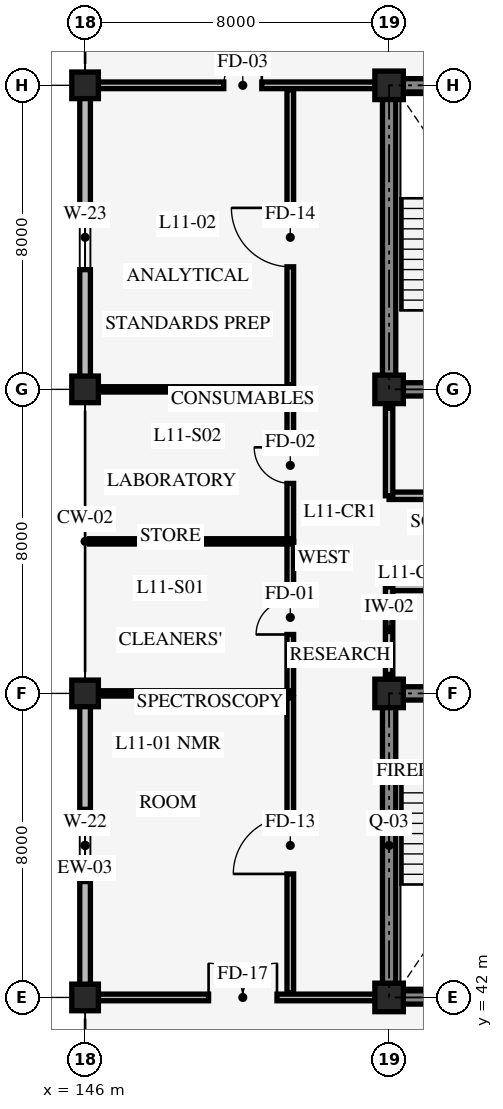
"""IFC4 building model, lengths in metres.
Left out: names, types, materials, properties, quantities, classifications, styles, units other than length and angle.
Written with IfcOpenShell. Run it as: python <this file> out.ifc"""

import sys

from ifc_helpers import new_model, si_unit, direction, frame, frame_2d, origin, origin_2d, place, context, subcontext, project, spatial, rectangle, extrude, element, fill, save


model = new_model("IFC4")
c1 = context("Model", 3, precision=1e-05, world=origin(), true_north=direction((0.0, 1.0)))
c2 = subcontext(c1, "Body", "Model", "MODEL_VIEW")
j1 = project(units=[si_unit("LENGTHUNIT", "METRE"), si_unit("PLANEANGLEUNIT", "RADIAN")], contexts=[c1])
p1 = place(None, origin())
s1 = spatial("IfcSite", under=j1, at=p1, CompositionType="ELEMENT")
p2 = place(p1, origin())
s2 = spatial("IfcBuilding", under=s1, at=p2, CompositionType="ELEMENT")
p3 = place(p2, frame((0.0, 0.0, 44.4)))
s3 = spatial("IfcBuildingStorey", under=s2, at=p3, CompositionType="ELEMENT", Elevation=44.4)
p4 = place(p3, frame((154.0, 42.0, 0.0), z_axis=(0.0, 0.0, 1.0), x_axis=(1.0, 0.0, 0.0)))
e1 = element("IfcWall", 1, at=p4, inside=s3, PredefinedType="SHEAR", context=c2, shape_type="SweptSolid", body=[
    extrude(rectangle(XDim=8.0, YDim=0.35, at=frame_2d((4.0, 0.0))), origin(), (0.0, 0.0, 1.0), 3.95),
])
p5 = place(p3, frame((162.0, 50.0, 0.0), z_axis=(0.0, 0.0, 1.0), x_axis=(-1.0, 0.0, 0.0)))
e2 = element("IfcWall", 2, at=p5, inside=s3, PredefinedType="SHEAR", context=c2, shape_type="SweptSolid", body=[
    extrude(rectangle(XDim=8.0, YDim=0.35, at=frame_2d((4.0, 0.0))), origin(), (0.0, 0.0, 1.0), 3.95),
])
p6 = place(p5, frame((5.3, 0.0, 0.0)))
e3 = element("IfcOpeningElement", 3, at=p6, cuts=e2, PredefinedType="OPENING", context=c2, shape_type="SweptSolid", body=[
    extrude(rectangle(XDim=1.3, YDim=2.15, at=frame_2d((0.65, 1.075))), frame((0.0, 0.185, 0.0), z_axis=(0.0, -1.0, 0.0), x_axis=(1.0, 0.0, 0.0)), (0.0, 0.0, 1.0), 0.37),
])
p7 = place(p5, frame((1.45, 0.0, 0.0)))
e4 = element("IfcOpeningElement", 4, at=p7, cuts=e2, PredefinedType="OPENING", context=c2, shape_type="SweptSolid", body=[
    extrude(rectangle(XDim=1.1, YDim=2.2, at=frame_2d((0.55, 1.1))), frame((0.0, 0.185, 0.0), z_axis=(0.0, -1.0, 0.0), x_axis=(1.0, 0.0, 0.0)), (0.0, 0.0, 1.0), 0.37),
])
p8 = place(p3, frame((154.0, 50.0, 0.0), z_axis=(0.0, 0.0, 1.0), x_axis=(0.0, -1.0, 0.0)))
e5 = element("IfcWall", 5, at=p8, inside=s3, PredefinedType="SHEAR", context=c2, shape_type="SweptSolid", body=[
    extrude(rectangle(XDim=8.0, YDim=0.35, at=frame_2d((4.0, 0.0))), origin(), (0.0, 0.0, 1.0), 3.95),
])
p9 = place(p3, frame((154.0, 58.0, 0.0), z_axis=(0.0, 0.0, 1.0), x_axis=(1.0, 0.0, 0.0)))
e6 = element("IfcWall", 6, at=p9, inside=s3, PredefinedType="SHEAR", context=c2, shape_type="SweptSolid", body=[
    extrude(rectangle(XDim=8.0, YDim=0.35, at=frame_2d((4.0, 0.0))), origin(), (0.0, 0.0, 1.0), 3.95),
])
p10 = place(p9, frame((1.4, 0.0, 0.0)))
e7 = element("IfcOpeningElement", 7, at=p10, cuts=e6, PredefinedType="OPENING", context=c2, shape_type="SweptSolid", body=[
    extrude(rectangle(XDim=1.3, YDim=2.15, at=frame_2d((0.65, 1.075))), frame((0.0, 0.185, 0.0), z_axis=(0.0, -1.0, 0.0), x_axis=(1.0, 0.0, 0.0)), (0.0, 0.0, 1.0), 0.37),
])
p11 = place(p9, frame((5.3, 0.0, 0.0)))
e8 = element("IfcOpeningElement", 8, at=p11, cuts=e6, PredefinedType="OPENING", context=c2, shape_type="SweptSolid", body=[
    extrude(rectangle(XDim=1.1, YDim=2.2, at=frame_2d((0.55, 1.1))), frame((0.0, 0.185, 0.0), z_axis=(0.0, -1.0, 0.0), x_axis=(1.0, 0.0, 0.0)), (0.0, 0.0, 1.0), 0.37),
])
for number, where, z_axis, x_axis in (
    (9, (162.0, 66.0, 0.0), (0.0, 0.0, 1.0), (-1.0, 0.0, 0.0)),
    (10, (154.0, 66.0, 0.0), (0.0, 0.0, 1.0), (0.0, -1.0, 0.0)),
):
    element("IfcWall", number, at=place(p3, frame(where, z_axis=z_axis, x_axis=x_axis)), inside=s3, PredefinedType="SHEAR", context=c2, shape_type="SweptSolid", body=[
        extrude(rectangle(XDim=8.0, YDim=0.35, at=frame_2d((4.0, 0.0))), origin(), (0.0, 0.0, 1.0), 3.95),
    ])
for number, where, z_axis, x_axis in (
    (11, (146.0, 42.0, 0.0), (0.0, 0.0, 1.0), (1.0, 0.0, 0.0)),
    (12, (146.0, 50.0, 0.0), (0.0, 0.0, 1.0), (1.0, 0.0, 0.0)),
    (13, (146.0, 58.0, 0.0), (0.0, 0.0, 1.0), (1.0, 0.0, 0.0)),
    (14, (146.0, 66.0, 0.0), (0.0, 0.0, 1.0), (1.0, 0.0, 0.0)),
):
    element("IfcColumn", number, at=place(p3, frame(where, z_axis=z_axis, x_axis=x_axis)), inside=s3, PredefinedType="COLUMN", context=c2, shape_type="SweptSolid", body=[
        extrude(rectangle(XDim=0.7, YDim=0.7, at=origin_2d()), origin(), (0.0, 0.0, 1.0), 4.2),
    ])
for number, where, z_axis, x_axis in (
    (15, (154.0, 42.0, 0.0), (0.0, 0.0, 1.0), (1.0, 0.0, 0.0)),
    (16, (154.0, 50.0, 0.0), (0.0, 0.0, 1.0), (1.0, 0.0, 0.0)),
    (17, (154.0, 58.0, 0.0), (0.0, 0.0, 1.0), (1.0, 0.0, 0.0)),
    (18, (154.0, 66.0, 0.0), (0.0, 0.0, 1.0), (1.0, 0.0, 0.0)),
):
    element("IfcColumn", number, at=place(p3, frame(where, z_axis=z_axis, x_axis=x_axis)), inside=s3, PredefinedType="COLUMN", context=c2, shape_type="SweptSolid", body=[
        extrude(rectangle(XDim=0.75, YDim=0.75, at=origin_2d()), origin(), (0.0, 0.0, 1.0), 4.2),
    ])
p12 = place(p3, frame((146.0, 42.0, 0.0), z_axis=(0.0, 0.0, 1.0), x_axis=(0.0, 1.0, 0.0)))
e19 = element("IfcWall", 19, at=p12, inside=s3, PredefinedType="STANDARD", context=c2, shape_type="SweptSolid", body=[
    extrude(rectangle(XDim=8.0, YDim=0.28, at=frame_2d((4.0, 0.0))), origin(), (0.0, 0.0, 1.0), 3.24),
])
p13 = place(p12, frame((3.05, 0.0, 0.85)))
e20 = element("IfcOpeningElement", 20, at=p13, cuts=e19, PredefinedType="OPENING", context=c2, shape_type="SweptSolid", body=[
    extrude(rectangle(XDim=1.9, YDim=1.3, at=frame_2d((0.95, 0.65))), frame((0.0, 0.15, 0.0), z_axis=(0.0, -1.0, 0.0), x_axis=(1.0, 0.0, 0.0)), (0.0, 0.0, 1.0), 0.3),
])
p14 = place(p3, frame((146.0, 58.0, 0.0), z_axis=(0.0, 0.0, 1.0), x_axis=(0.0, 1.0, 0.0)))
e21 = element("IfcWall", 21, at=p14, inside=s3, PredefinedType="STANDARD", context=c2, shape_type="SweptSolid", body=[
    extrude(rectangle(XDim=8.0, YDim=0.28, at=frame_2d((4.0, 0.0))), origin(), (0.0, 0.0, 1.0), 3.24),
])
p15 = place(p14, frame((3.15, 0.0, 0.85)))
e22 = element("IfcOpeningElement", 22, at=p15, cuts=e21, PredefinedType="OPENING", context=c2, shape_type="SweptSolid", body=[
    extrude(rectangle(XDim=1.7, YDim=1.2, at=frame_2d((0.85, 0.6))), frame((0.0, 0.15, 0.0), z_axis=(0.0, -1.0, 0.0), x_axis=(1.0, 0.0, 0.0)), (0.0, 0.0, 1.0), 0.3),
])
p16 = place(p3, frame((154.0, 52.8, 0.0), z_axis=(0.0, 0.0, 1.0), x_axis=(1.0, 0.0, 0.0)))
e23 = element("IfcWall", 23, at=p16, inside=s3, PredefinedType="STANDARD", context=c2, shape_type="SweptSolid", body=[
    extrude(rectangle(XDim=7.6, YDim=0.195, at=frame_2d((3.8, 0.0))), origin(), (0.0, 0.0, 1.0), 3.9),
])
p17 = place(p16, frame((2.8, 0.0, 0.0)))
e24 = element("IfcOpeningElement", 24, at=p17, cuts=e23, PredefinedType="OPENING", context=c2, shape_type="SweptSolid", body=[
    extrude(rectangle(XDim=1.45, YDim=2.2, at=frame_2d((0.725, 1.1))), frame((0.0, 0.107, 0.0), z_axis=(0.0, -1.0, 0.0), x_axis=(1.0, 0.0, 0.0)), (0.0, 0.0, 1.0), 0.215),
])
p18 = place(p3, frame((154.0, 50.5, 0.0), z_axis=(0.0, 0.0, 1.0), x_axis=(0.0, 1.0, 0.0)))
e25 = element("IfcWall", 25, at=p18, inside=s3, PredefinedType="STANDARD", context=c2, shape_type="SweptSolid", body=[
    extrude(rectangle(XDim=2.3, YDim=0.195, at=frame_2d((1.15, 0.0))), origin(), (0.0, 0.0, 1.0), 3.24),
])
p19 = place(p3, frame((154.0, 55.2, 0.0), z_axis=(0.0, 0.0, 1.0), x_axis=(1.0, 0.0, 0.0)))
e26 = element("IfcWall", 26, at=p19, inside=s3, PredefinedType="STANDARD", context=c2, shape_type="SweptSolid", body=[
    extrude(rectangle(XDim=7.6, YDim=0.195, at=frame_2d((3.8, 0.0))), origin(), (0.0, 0.0, 1.0), 3.9),
])
p20 = place(p19, frame((2.8, 0.0, 0.0)))
e27 = element("IfcOpeningElement", 27, at=p20, cuts=e26, PredefinedType="OPENING", context=c2, shape_type="SweptSolid", body=[
    extrude(rectangle(XDim=1.25, YDim=2.15, at=frame_2d((0.625, 1.075))), frame((0.0, 0.107, 0.0), z_axis=(0.0, -1.0, 0.0), x_axis=(1.0, 0.0, 0.0)), (0.0, 0.0, 1.0), 0.215),
])
p21 = place(p3, frame((154.0, 55.2, 0.0), z_axis=(0.0, 0.0, 1.0), x_axis=(0.0, 1.0, 0.0)))
e28 = element("IfcWall", 28, at=p21, inside=s3, PredefinedType="STANDARD", context=c2, shape_type="SweptSolid", body=[
    extrude(rectangle(XDim=2.3, YDim=0.195, at=frame_2d((1.15, 0.0))), origin(), (0.0, 0.0, 1.0), 3.24),
])
p22 = place(p3, frame((151.4, 42.12, 0.0), z_axis=(0.0, 0.0, 1.0), x_axis=(0.0, 1.0, 0.0)))
e29 = element("IfcWall", 29, at=p22, inside=s3, PredefinedType="STANDARD", context=c2, shape_type="SweptSolid", body=[
    extrude(rectangle(XDim=7.76, YDim=0.175, at=frame_2d((3.88, 0.0))), origin(), (0.0, 0.0, 1.0), 3.9),
])
p23 = place(p22, frame((3.13, 0.0, 0.0)))
e30 = element("IfcOpeningElement", 30, at=p23, cuts=e29, PredefinedType="OPENING", context=c2, shape_type="SweptSolid", body=[
    extrude(rectangle(XDim=1.5, YDim=2.2, at=frame_2d((0.75, 1.1))), frame((0.0, 0.098, 0.0), z_axis=(0.0, -1.0, 0.0), x_axis=(1.0, 0.0, 0.0)), (0.0, 0.0, 1.0), 0.195),
])
p24 = place(p3, frame((151.4, 58.12, 0.0), z_axis=(0.0, 0.0, 1.0), x_axis=(0.0, 1.0, 0.0)))
e31 = element("IfcWall", 31, at=p24, inside=s3, PredefinedType="STANDARD", context=c2, shape_type="SweptSolid", body=[
    extrude(rectangle(XDim=7.76, YDim=0.175, at=frame_2d((3.88, 0.0))), origin(), (0.0, 0.0, 1.0), 3.9),
])
p25 = place(p24, frame((3.105, 0.0, 0.0)))
e32 = element("IfcOpeningElement", 32, at=p25, cuts=e31, PredefinedType="OPENING", context=c2, shape_type="SweptSolid", body=[
    extrude(rectangle(XDim=1.55, YDim=2.25, at=frame_2d((0.775, 1.125))), frame((0.0, 0.098, 0.0), z_axis=(0.0, -1.0, 0.0), x_axis=(1.0, 0.0, 0.0)), (0.0, 0.0, 1.0), 0.195),
])
p26 = place(p3, frame((151.4, 50.0, 0.0), z_axis=(0.0, 0.0, 1.0), x_axis=(0.0, 1.0, 0.0)))
e33 = element("IfcWall", 33, at=p26, inside=s3, PredefinedType="STANDARD", context=c2, shape_type="SweptSolid", body=[
    extrude(rectangle(XDim=4.0, YDim=0.175, at=frame_2d((2.0, 0.0))), origin(), (0.0, 0.0, 1.0), 3.9),
])
p27 = place(p26, frame((1.55, 0.0, 0.0)))
e34 = element("IfcOpeningElement", 34, at=p27, cuts=e33, PredefinedType="OPENING", context=c2, shape_type="SweptSolid", body=[
    extrude(rectangle(XDim=0.9, YDim=2.1, at=frame_2d((0.45, 1.05))), frame((0.0, 0.098, 0.0), z_axis=(0.0, -1.0, 0.0), x_axis=(1.0, 0.0, 0.0)), (0.0, 0.0, 1.0), 0.195),
])
p28 = place(p3, frame((151.4, 54.0, 0.0), z_axis=(0.0, 0.0, 1.0), x_axis=(0.0, 1.0, 0.0)))
e35 = element("IfcWall", 35, at=p28, inside=s3, PredefinedType="STANDARD", context=c2, shape_type="SweptSolid", body=[
    extrude(rectangle(XDim=4.0, YDim=0.175, at=frame_2d((2.0, 0.0))), origin(), (0.0, 0.0, 1.0), 3.9),
])
p29 = place(p28, frame((1.525, 0.0, 0.0)))
e36 = element("IfcOpeningElement", 36, at=p29, cuts=e35, PredefinedType="OPENING", context=c2, shape_type="SweptSolid", body=[
    extrude(rectangle(XDim=0.95, YDim=2.1, at=frame_2d((0.475, 1.05))), frame((0.0, 0.098, 0.0), z_axis=(0.0, -1.0, 0.0), x_axis=(1.0, 0.0, 0.0)), (0.0, 0.0, 1.0), 0.195),
])
p30 = place(p3, frame((146.12, 50.0, 0.0), z_axis=(0.0, 0.0, 1.0), x_axis=(1.0, 0.0, 0.0)))
e37 = element("IfcWall", 37, at=p30, inside=s3, PredefinedType="STANDARD", context=c2, shape_type="SweptSolid", body=[
    extrude(rectangle(XDim=5.28, YDim=0.14, at=frame_2d((2.64, 0.0))), origin(), (0.0, 0.0, 1.0), 3.19),
])
p31 = place(p3, frame((146.12, 54.0, 0.0), z_axis=(0.0, 0.0, 1.0), x_axis=(1.0, 0.0, 0.0)))
e38 = element("IfcWall", 38, at=p31, inside=s3, PredefinedType="STANDARD", context=c2, shape_type="SweptSolid", body=[
    extrude(rectangle(XDim=5.28, YDim=0.14, at=frame_2d((2.64, 0.0))), origin(), (0.0, 0.0, 1.0), 3.9),
])
p32 = place(p3, frame((146.12, 58.0, 0.0), z_axis=(0.0, 0.0, 1.0), x_axis=(1.0, 0.0, 0.0)))
e39 = element("IfcWall", 39, at=p32, inside=s3, PredefinedType="STANDARD", context=c2, shape_type="SweptSolid", body=[
    extrude(rectangle(XDim=5.28, YDim=0.14, at=frame_2d((2.64, 0.0))), origin(), (0.0, 0.0, 1.0), 3.19),
])
p33 = place(p3, frame((146.35, 42.0, 0.0), z_axis=(0.0, 0.0, 1.0), x_axis=(1.0, 0.0, 0.0)))
e40 = element("IfcWall", 40, at=p33, inside=s3, PredefinedType="STANDARD", context=c2, shape_type="SweptSolid", body=[
    extrude(rectangle(XDim=7.3, YDim=0.175, at=frame_2d((3.65, 0.0))), origin(), (0.0, 0.0, 1.0), 3.19),
])
p34 = place(p33, frame((2.9, 0.0, 0.0)))
e41 = element("IfcOpeningElement", 41, at=p34, cuts=e40, PredefinedType="OPENING", context=c2, shape_type="SweptSolid", body=[
    extrude(rectangle(XDim=1.8, YDim=2.3, at=frame_2d((0.9, 1.15))), frame((0.0, 0.098, 0.0), z_axis=(0.0, -1.0, 0.0), x_axis=(1.0, 0.0, 0.0)), (0.0, 0.0, 1.0), 0.195),
])
p35 = place(p3, frame((146.35, 66.0, 0.0), z_axis=(0.0, 0.0, 1.0), x_axis=(1.0, 0.0, 0.0)))
e42 = element("IfcWall", 42, at=p35, inside=s3, PredefinedType="STANDARD", context=c2, shape_type="SweptSolid", body=[
    extrude(rectangle(XDim=7.3, YDim=0.175, at=frame_2d((3.65, 0.0))), origin(), (0.0, 0.0, 1.0), 3.19),
])
p36 = place(p35, frame((3.3, 0.0, 0.0)))
e43 = element("IfcOpeningElement", 43, at=p36, cuts=e42, PredefinedType="OPENING", context=c2, shape_type="SweptSolid", body=[
    extrude(rectangle(XDim=1.0, YDim=2.1, at=frame_2d((0.5, 1.05))), frame((0.0, 0.098, 0.0), z_axis=(0.0, -1.0, 0.0), x_axis=(1.0, 0.0, 0.0)), (0.0, 0.0, 1.0), 0.195),
])
p37 = place(p13, origin())
e44 = element("IfcWindow", 44, at=p37, inside=s3, PartitioningType="SINGLE_PANEL", PredefinedType="WINDOW", context=c2, shape_type="SweptSolid", body=[
    extrude(rectangle(XDim=1.9, YDim=1.3, at=frame_2d((0.95, 0.65))), frame((0.0, 0.03, 0.0), z_axis=(0.0, -1.0, 0.0), x_axis=(1.0, 0.0, 0.0)), (0.0, 0.0, 1.0), 0.06),
])
fill(e20, e44)
p38 = place(p15, origin())
e45 = element("IfcWindow", 45, at=p38, inside=s3, PartitioningType="SINGLE_PANEL", PredefinedType="WINDOW", context=c2, shape_type="SweptSolid", body=[
    extrude(rectangle(XDim=1.7, YDim=1.2, at=frame_2d((0.85, 0.6))), frame((0.0, 0.03, 0.0), z_axis=(0.0, -1.0, 0.0), x_axis=(1.0, 0.0, 0.0)), (0.0, 0.0, 1.0), 0.06),
])
fill(e22, e45)
p39 = place(p23, origin())
e46 = element("IfcDoor", 46, at=p39, inside=s3, OperationType="SINGLE_SWING_LEFT", PredefinedType="DOOR", context=c2, shape_type="SweptSolid", body=[
    extrude(rectangle(XDim=1.5, YDim=2.2, at=frame_2d((0.75, 1.1))), frame((0.0, 0.025, 0.0), z_axis=(0.0, -1.0, 0.0), x_axis=(1.0, 0.0, 0.0)), (0.0, 0.0, 1.0), 0.05),
])
fill(e30, e46)
p40 = place(p25, origin())
e47 = element("IfcDoor", 47, at=p40, inside=s3, OperationType="SINGLE_SWING_RIGHT", PredefinedType="DOOR", context=c2, shape_type="SweptSolid", body=[
    extrude(rectangle(XDim=1.55, YDim=2.25, at=frame_2d((0.775, 1.125))), frame((0.0, 0.025, 0.0), z_axis=(0.0, -1.0, 0.0), x_axis=(1.0, 0.0, 0.0)), (0.0, 0.0, 1.0), 0.05),
])
fill(e32, e47)
p41 = place(p27, origin())
e48 = element("IfcDoor", 48, at=p41, inside=s3, OperationType="SINGLE_SWING_LEFT", PredefinedType="DOOR", context=c2, shape_type="SweptSolid", body=[
    extrude(rectangle(XDim=0.9, YDim=2.1, at=frame_2d((0.45, 1.05))), frame((0.0, 0.025, 0.0), z_axis=(0.0, -1.0, 0.0), x_axis=(1.0, 0.0, 0.0)), (0.0, 0.0, 1.0), 0.05),
])
fill(e34, e48)
p42 = place(p29, origin())
e49 = element("IfcDoor", 49, at=p42, inside=s3, OperationType="SINGLE_SWING_RIGHT", PredefinedType="DOOR", context=c2, shape_type="SweptSolid", body=[
    extrude(rectangle(XDim=0.95, YDim=2.1, at=frame_2d((0.475, 1.05))), frame((0.0, 0.025, 0.0), z_axis=(0.0, -1.0, 0.0), x_axis=(1.0, 0.0, 0.0)), (0.0, 0.0, 1.0), 0.05),
])
fill(e36, e49)
p43 = place(p34, origin())
e50 = element("IfcDoor", 50, at=p43, inside=s3, OperationType="DOUBLE_DOOR_SINGLE_SWING", PredefinedType="DOOR", context=c2, shape_type="SweptSolid", body=[
    extrude(rectangle(XDim=1.8, YDim=2.3, at=frame_2d((0.9, 1.15))), frame((0.0, 0.025, 0.0), z_axis=(0.0, -1.0, 0.0), x_axis=(1.0, 0.0, 0.0)), (0.0, 0.0, 1.0), 0.05),
])
fill(e41, e50)
p44 = place(p36, origin())
e51 = element("IfcDoor", 51, at=p44, inside=s3, OperationType="SINGLE_SWING_RIGHT", PredefinedType="DOOR", context=c2, shape_type="SweptSolid", body=[
    extrude(rectangle(XDim=1.0, YDim=2.1, at=frame_2d((0.5, 1.05))), frame((0.0, 0.025, 0.0), z_axis=(0.0, -1.0, 0.0), x_axis=(1.0, 0.0, 0.0)), (0.0, 0.0, 1.0), 0.05),
])
fill(e43, e51)
save(model, sys.argv[1])
